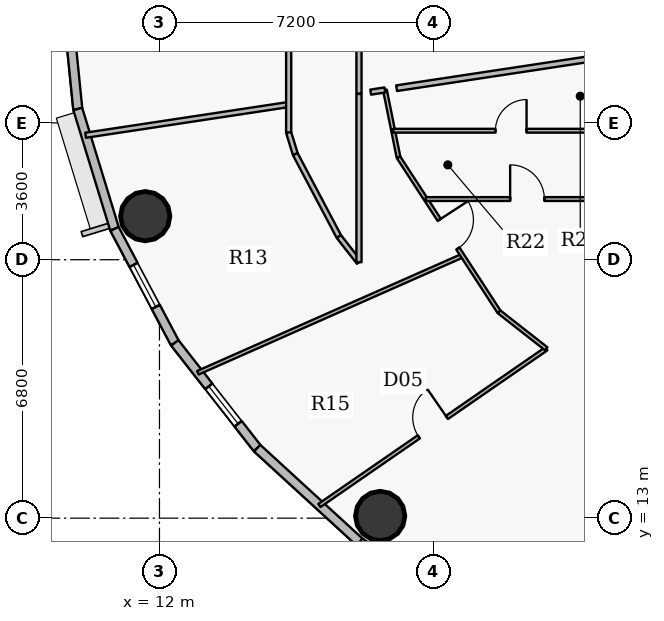
"""IFC4 building model, lengths in metres.
Left out: names, types, materials, properties, quantities, classifications, styles, units other than length and angle.
Written with IfcOpenShell. Run it as: python <this file> out.ifc"""

import sys

from ifc_helpers import new_model, si_unit, direction, frame, frame_2d, origin, origin_2d, place, context, subcontext, project, spatial, rectangle, hollow_circle, extrude, source, transform, mapped, element, fill, save


model = new_model("IFC4")
c1 = context("Model", 3, precision=1e-05, world=origin(), true_north=direction((0.0, 1.0)))
c2 = subcontext(c1, "Body", "Model", "MODEL_VIEW")
j1 = project(units=[si_unit("LENGTHUNIT", "METRE"), si_unit("PLANEANGLEUNIT", "RADIAN")], contexts=[c1])
p1 = place(None, origin())
s1 = spatial("IfcSite", under=j1, at=p1, CompositionType="ELEMENT")
p2 = place(p1, origin())
s2 = spatial("IfcBuilding", under=s1, at=p2, CompositionType="ELEMENT")
p3 = place(p2, frame((0.0, 0.0, 163.65)))
s3 = spatial("IfcBuildingStorey", under=s2, at=p3, CompositionType="ELEMENT", Elevation=163.65)
for number, where, z_axis, x_axis in (
    (1, (11.625, 20.947, 0.0), (0.0, 0.0, 1.0), (1.0, 0.0, 0.0)),
    (2, (17.808, 13.058, 0.0), (0.0, 0.0, 1.0), (1.0, 0.0, 0.0)),
):
    element("IfcColumn", number, at=place(p3, frame(where, z_axis=z_axis, x_axis=x_axis)), inside=s3, PredefinedType="COLUMN", context=c2, shape_type="SweptSolid", body=[
        extrude(hollow_circle(Radius=0.65, WallThickness=0.04, at=origin_2d()), origin(), (0.0, 0.0, 1.0), 3.75),
    ])
p4 = place(p3, frame((9.85, 23.766, 0.0), z_axis=(0.0, 0.0, 1.0), x_axis=(-0.100061534614, 0.994981250723, 0.0)))
e3 = element("IfcWall", 3, at=p4, inside=s3, PredefinedType="SOLIDWALL", context=c2, shape_type="SweptSolid", body=[
    extrude(rectangle(XDim=3.25, YDim=0.24, at=frame_2d((1.625, 0.0))), origin(), (0.0, 0.0, 1.0), 3.5),
])
p5 = place(p3, frame((10.817, 20.611, 0.0), z_axis=(0.0, 0.0, 1.0), x_axis=(-0.293097995113, 0.956082405058, 0.0)))
e4 = element("IfcWall", 4, at=p5, inside=s3, PredefinedType="SOLIDWALL", context=c2, shape_type="SweptSolid", body=[
    extrude(rectangle(XDim=3.3, YDim=0.24, at=frame_2d((1.65, 0.0))), origin(), (0.0, 0.0, 1.0), 3.5),
])
p6 = place(p3, frame((12.404, 17.612, 0.0), z_axis=(0.0, 0.0, 1.0), x_axis=(-0.467586874938, 0.88394712194, 0.0)))
e5 = element("IfcWall", 5, at=p6, inside=s3, PredefinedType="SOLIDWALL", context=c2, shape_type="SweptSolid", body=[
    extrude(rectangle(XDim=3.393, YDim=0.24, at=frame_2d((1.697, 0.0))), origin(), (0.0, 0.0, 1.0), 3.5),
])
p7 = place(p6, frame((1.072, 0.0, 0.9)))
e6 = element("IfcOpeningElement", 6, at=p7, cuts=e5, PredefinedType="OPENING", context=c2, shape_type="SweptSolid", body=[
    extrude(rectangle(XDim=1.25, YDim=1.65, at=origin_2d()), frame((0.625, 0.13, 0.825), z_axis=(0.0, -1.0, 0.0), x_axis=(1.0, 0.0, 0.0)), (0.0, 0.0, 1.0), 0.26),
])
p8 = place(p3, frame((14.572, 14.842, 0.0), z_axis=(0.0, 0.0, 1.0), x_axis=(-0.616287674549, 0.787521112224, 0.0)))
e7 = element("IfcWall", 7, at=p8, inside=s3, PredefinedType="SOLIDWALL", context=c2, shape_type="SweptSolid", body=[
    extrude(rectangle(XDim=3.517, YDim=0.24, at=frame_2d((1.759, 0.0))), origin(), (0.0, 0.0, 1.0), 3.5),
])
p9 = place(p8, frame((0.816, 0.0, 0.9)))
e8 = element("IfcOpeningElement", 8, at=p9, cuts=e7, PredefinedType="OPENING", context=c2, shape_type="SweptSolid", body=[
    extrude(rectangle(XDim=1.25, YDim=1.65, at=origin_2d()), frame((0.625, 0.13, 0.825), z_axis=(0.0, -1.0, 0.0), x_axis=(1.0, 0.0, 0.0)), (0.0, 0.0, 1.0), 0.26),
])
p10 = place(p3, frame((17.268, 12.369, 0.0), z_axis=(0.0, 0.0, 1.0), x_axis=(-0.737076565834, 0.675809245349, 0.0)))
e9 = element("IfcWall", 9, at=p10, inside=s3, PredefinedType="SOLIDWALL", context=c2, shape_type="SweptSolid", body=[
    extrude(rectangle(XDim=3.658, YDim=0.24, at=frame_2d((1.829, 0.0))), origin(), (0.0, 0.0, 1.0), 3.5),
])
p11 = place(p3, frame((20.427, 10.257, 0.0), z_axis=(0.0, 0.0, 1.0), x_axis=(-0.831228998277, 0.555930168657, 0.0)))
e10 = element("IfcWall", 10, at=p11, inside=s3, PredefinedType="SOLIDWALL", context=c2, shape_type="SweptSolid", body=[
    extrude(rectangle(XDim=3.8, YDim=0.24, at=frame_2d((1.9, 0.0))), origin(), (0.0, 0.0, 1.0), 3.5),
])
p12 = place(p3, frame((10.057, 23.075, 0.0), z_axis=(0.0, 0.0, 1.0), x_axis=(0.988756022356, 0.14953771516, 0.0)))
e11 = element("IfcWall", 11, at=p12, inside=s3, PredefinedType="PARTITIONING", context=c2, shape_type="SweptSolid", body=[
    extrude(rectangle(XDim=5.404, YDim=0.135, at=frame_2d((2.702, 0.0))), origin(), (0.0, 0.0, 1.0), 2.935),
])
p13 = place(p3, frame((13.012, 16.827, 0.0), z_axis=(0.0, 0.0, 1.0), x_axis=(0.914460954348, 0.404674144185, 0.0)))
e12 = element("IfcWall", 12, at=p13, inside=s3, PredefinedType="PARTITIONING", context=c2, shape_type="SweptSolid", body=[
    extrude(rectangle(XDim=7.614, YDim=0.1, at=frame_2d((3.807, 0.0))), origin(), (0.0, 0.0, 1.0), 2.935),
])
p14 = place(p3, frame((15.4, 23.146, 0.0), z_axis=(0.0, 0.0, 1.0), x_axis=(0.0, 1.0, 0.0)))
e13 = element("IfcWall", 13, at=p14, inside=s3, PredefinedType="PARTITIONING", context=c2, shape_type="SweptSolid", body=[
    extrude(rectangle(XDim=4.804, YDim=0.135, at=frame_2d((2.402, 0.0))), origin(), (0.0, 0.0, 1.0), 2.935),
])
p15 = place(p14, frame((2.251, 0.0, 0.0)))
e14 = element("IfcOpeningElement", 14, at=p15, cuts=e13, PredefinedType="OPENING", context=c2, shape_type="SweptSolid", body=[
    extrude(rectangle(XDim=1.0, YDim=2.15, at=origin_2d()), frame((0.5, 0.078, 1.075), z_axis=(0.0, -1.0, 0.0), x_axis=(1.0, 0.0, 0.0)), (0.0, 0.0, 1.0), 0.155),
])
p16 = place(p3, frame((15.4, 23.146, 0.0), z_axis=(0.0, 0.0, 1.0), x_axis=(0.293335154151, -0.956009669061, 0.0)))
e15 = element("IfcWall", 15, at=p16, inside=s3, PredefinedType="PARTITIONING", context=c2, shape_type="SweptSolid", body=[
    extrude(rectangle(XDim=0.594, YDim=0.135, at=frame_2d((0.297, 0.0))), origin(), (0.0, 0.0, 1.0), 3.5),
])
p17 = place(p3, frame((15.574, 22.578, 0.0), z_axis=(0.0, 0.0, 1.0), x_axis=(0.46757196543, -0.883955008552, 0.0)))
e16 = element("IfcWall", 16, at=p17, inside=s3, PredefinedType="PARTITIONING", context=c2, shape_type="SweptSolid", body=[
    extrude(rectangle(XDim=2.451, YDim=0.135, at=frame_2d((1.226, 0.0))), origin(), (0.0, 0.0, 1.0), 2.935),
])
p18 = place(p3, frame((16.209, 13.333, 0.0), z_axis=(0.0, 0.0, 1.0), x_axis=(0.82287966827, 0.568215673444, 0.0)))
e17 = element("IfcWall", 17, at=p18, inside=s3, PredefinedType="PARTITIONING", context=c2, shape_type="SweptSolid", body=[
    extrude(rectangle(XDim=7.255, YDim=0.1, at=frame_2d((3.628, 0.0))), origin(), (0.0, 0.0, 1.0), 2.935),
])
p19 = place(p18, frame((3.177, 0.0, 0.0)))
e18 = element("IfcOpeningElement", 18, at=p19, cuts=e17, PredefinedType="OPENING", context=c2, shape_type="SweptSolid", body=[
    extrude(rectangle(XDim=0.9, YDim=2.1, at=origin_2d()), frame((0.45, 0.06, 1.05), z_axis=(0.0, -1.0, 0.0), x_axis=(1.0, 0.0, 0.0)), (0.0, 0.0, 1.0), 0.12),
])
p20 = place(p3, frame((16.72, 20.411, 0.0), z_axis=(0.0, 0.0, 1.0), x_axis=(0.616377221056, -0.787451027914, 0.0)))
e19 = element("IfcWall", 19, at=p20, inside=s3, PredefinedType="PARTITIONING", context=c2, shape_type="SweptSolid", body=[
    extrude(rectangle(XDim=0.859, YDim=0.135, at=frame_2d((0.43, 0.0))), origin(), (0.0, 0.0, 1.0), 3.5),
])
p21 = place(p3, frame((17.25, 19.734, 0.0), z_axis=(0.0, 0.0, 1.0), x_axis=(0.0, 1.0, 0.0)))
e20 = element("IfcWall", 20, at=p21, inside=s3, PredefinedType="PARTITIONING", context=c2, shape_type="SweptSolid", body=[
    extrude(rectangle(XDim=4.429, YDim=0.135, at=frame_2d((2.215, 0.0))), origin(), (0.0, 0.0, 1.0), 2.935),
])
p22 = place(p3, frame((17.933, 24.267, 0.0), z_axis=(0.0, 0.0, 1.0), x_axis=(0.198166528342, -0.980168366682, 0.0)))
e21 = element("IfcWall", 21, at=p22, inside=s3, PredefinedType="PARTITIONING", context=c2, shape_type="SweptSolid", body=[
    extrude(rectangle(XDim=1.809, YDim=0.1, at=frame_2d((0.904, 0.0))), origin(), (0.0, 0.0, 1.0), 2.935),
])
p23 = place(p3, frame((18.15, 23.195, 0.0), z_axis=(0.0, 0.0, 1.0), x_axis=(1.0, 0.0, 0.0)))
e22 = element("IfcWall", 22, at=p23, inside=s3, PredefinedType="PARTITIONING", context=c2, shape_type="SweptSolid", body=[
    extrude(rectangle(XDim=6.2, YDim=0.1, at=frame_2d((3.1, 0.0))), origin(), (0.0, 0.0, 1.0), 2.935),
])
p24 = place(p23, frame((2.69, 0.0, 0.0)))
e23 = element("IfcOpeningElement", 23, at=p24, cuts=e22, PredefinedType="OPENING", context=c2, shape_type="SweptSolid", body=[
    extrude(rectangle(XDim=0.82, YDim=2.1, at=origin_2d()), frame((0.41, 0.06, 1.05), z_axis=(0.0, -1.0, 0.0), x_axis=(1.0, 0.0, 0.0)), (0.0, 0.0, 1.0), 0.12),
])
p25 = place(p3, frame((18.291, 22.494, 0.0), z_axis=(0.0, 0.0, 1.0), x_axis=(0.545405921784, -0.838172047066, 0.0)))
e24 = element("IfcWall", 24, at=p25, inside=s3, PredefinedType="PARTITIONING", context=c2, shape_type="SweptSolid", body=[
    extrude(rectangle(XDim=4.849, YDim=0.1, at=frame_2d((2.425, 0.0))), origin(), (0.0, 0.0, 1.0), 2.935),
])
p26 = place(p25, frame((1.962, 0.0, 0.0)))
e25 = element("IfcOpeningElement", 25, at=p26, cuts=e24, PredefinedType="OPENING", context=c2, shape_type="SweptSolid", body=[
    extrude(rectangle(XDim=0.9, YDim=2.1, at=origin_2d()), frame((0.45, 0.06, 1.05), z_axis=(0.0, -1.0, 0.0), x_axis=(1.0, 0.0, 0.0)), (0.0, 0.0, 1.0), 0.12),
])
p27 = place(p3, frame((19.005, 21.397, 0.0), z_axis=(0.0, 0.0, 1.0), x_axis=(1.0, 0.0, 0.0)))
e26 = element("IfcWall", 26, at=p27, inside=s3, PredefinedType="PARTITIONING", context=c2, shape_type="SweptSolid", body=[
    extrude(rectangle(XDim=5.345, YDim=0.1, at=frame_2d((2.672, 0.0))), origin(), (0.0, 0.0, 1.0), 3.5),
])
p28 = place(p27, frame((2.222, 0.0, 0.0)))
e27 = element("IfcOpeningElement", 27, at=p28, cuts=e26, PredefinedType="OPENING", context=c2, shape_type="SweptSolid", body=[
    extrude(rectangle(XDim=0.9, YDim=2.1, at=origin_2d()), frame((0.45, 0.06, 1.05), z_axis=(0.0, -1.0, 0.0), x_axis=(1.0, 0.0, 0.0)), (0.0, 0.0, 1.0), 0.12),
])
p29 = place(p3, frame((20.936, 18.429, 0.0), z_axis=(0.0, 0.0, 1.0), x_axis=(0.787358146927, -0.61649586249, 0.0)))
e28 = element("IfcWall", 28, at=p29, inside=s3, PredefinedType="PARTITIONING", context=c2, shape_type="SweptSolid", body=[
    extrude(rectangle(XDim=1.579, YDim=0.1, at=frame_2d((0.79, 0.0))), origin(), (0.0, 0.0, 1.0), 3.185),
])
p30 = place(p3, frame((17.25, 26.05, 0.0), z_axis=(0.0, 0.0, 1.0), x_axis=(0.0, -1.0, 0.0)))
e29 = element("IfcWall", 29, at=p30, inside=s3, PredefinedType="PARTITIONING", context=c2, shape_type="SweptSolid", body=[
    extrude(rectangle(XDim=1.876, YDim=0.135, at=frame_2d((0.938, 0.0))), origin(), (0.0, 0.0, 1.0), 3.085),
])
p31 = place(p3, frame((17.558, 24.21, 0.0), z_axis=(0.0, 0.0, 1.0), x_axis=(0.988703952477, 0.149881601124, 0.0)))
e30 = element("IfcWall", 30, at=p31, inside=s3, PredefinedType="PARTITIONING", context=c2, shape_type="SweptSolid", body=[
    extrude(rectangle(XDim=0.38, YDim=0.135, at=frame_2d((0.19, 0.0))), origin(), (0.0, 0.0, 1.0), 3.085),
])
p32 = place(p3, frame((18.24, 24.313, 0.0), z_axis=(0.0, 0.0, 1.0), x_axis=(0.988751262043, 0.149569187364, 0.0)))
e31 = element("IfcWall", 31, at=p32, inside=s3, PredefinedType="PARTITIONING", context=c2, shape_type="SweptSolid", body=[
    extrude(rectangle(XDim=5.848, YDim=0.15, at=frame_2d((2.924, 0.0))), origin(), (0.0, 0.0, 1.0), 3.5),
])
m1 = source(origin(), c2, "Body", "SweptSolid", [
    extrude(rectangle(XDim=1.25, YDim=1.65, at=origin_2d()), frame((0.625, 0.03, 0.825), z_axis=(0.0, -1.0, 0.0), x_axis=(1.0, 0.0, 0.0)), (0.0, 0.0, 1.0), 0.06),
])
p33 = place(p9, origin())
e32 = element("IfcWindow", 32, at=p33, inside=s3, PartitioningType="SINGLE_PANEL", PredefinedType="WINDOW", context=c2, shape_type="MappedRepresentation", body=[
    mapped(m1, transform((0.0, 0.0, 0.0), x_axis=(1.0, 0.0, 0.0), y_axis=(0.0, 1.0, 0.0), z_axis=(0.0, 0.0, 1.0), scale=1.0)),
])
fill(e8, e32)
p34 = place(p7, origin())
e33 = element("IfcWindow", 33, at=p34, inside=s3, PartitioningType="SINGLE_PANEL", PredefinedType="WINDOW", context=c2, shape_type="MappedRepresentation", body=[
    mapped(m1, transform((0.0, 0.0, 0.0), x_axis=(1.0, 0.0, 0.0), y_axis=(0.0, 1.0, 0.0), z_axis=(0.0, 0.0, 1.0), scale=1.0)),
])
fill(e6, e33)
m2 = source(origin(), c2, "Body", "SweptSolid", [
    extrude(rectangle(XDim=0.9, YDim=2.1, at=origin_2d()), frame((0.45, 0.025, 1.05), z_axis=(0.0, -1.0, 0.0), x_axis=(1.0, 0.0, 0.0)), (0.0, 0.0, 1.0), 0.05),
])
p35 = place(p26, origin())
e34 = element("IfcDoor", 34, at=p35, inside=s3, OperationType="SINGLE_SWING_LEFT", PredefinedType="DOOR", context=c2, shape_type="MappedRepresentation", body=[
    mapped(m2, transform((0.0, 0.0, 0.0), x_axis=(1.0, 0.0, 0.0), y_axis=(0.0, 1.0, 0.0), z_axis=(0.0, 0.0, 1.0), scale=1.0)),
])
fill(e25, e34)
p36 = place(p19, origin())
e35 = element("IfcDoor", 35, at=p36, inside=s3, OperationType="SINGLE_SWING_RIGHT", PredefinedType="DOOR", context=c2, shape_type="MappedRepresentation", body=[
    mapped(m2, transform((0.0, 0.0, 0.0), x_axis=(1.0, 0.0, 0.0), y_axis=(0.0, 1.0, 0.0), z_axis=(0.0, 0.0, 1.0), scale=1.0)),
])
fill(e18, e35)
p37 = place(p28, origin())
e36 = element("IfcDoor", 36, at=p37, inside=s3, OperationType="SINGLE_SWING_LEFT", PredefinedType="DOOR", context=c2, shape_type="MappedRepresentation", body=[
    mapped(m2, transform((0.0, 0.0, 0.0), x_axis=(1.0, 0.0, 0.0), y_axis=(0.0, 1.0, 0.0), z_axis=(0.0, 0.0, 1.0), scale=1.0)),
])
fill(e27, e36)
m3 = source(origin(), c2, "Body", "SweptSolid", [
    extrude(rectangle(XDim=0.82, YDim=2.1, at=origin_2d()), frame((0.41, 0.025, 1.05), z_axis=(0.0, -1.0, 0.0), x_axis=(1.0, 0.0, 0.0)), (0.0, 0.0, 1.0), 0.05),
])
p38 = place(p24, origin())
e37 = element("IfcDoor", 37, at=p38, inside=s3, OperationType="SINGLE_SWING_RIGHT", PredefinedType="DOOR", context=c2, shape_type="MappedRepresentation", body=[
    mapped(m3, transform((0.0, 0.0, 0.0), x_axis=(1.0, 0.0, 0.0), y_axis=(0.0, 1.0, 0.0), z_axis=(0.0, 0.0, 1.0), scale=1.0)),
])
fill(e23, e37)
save(model, sys.argv[1])
